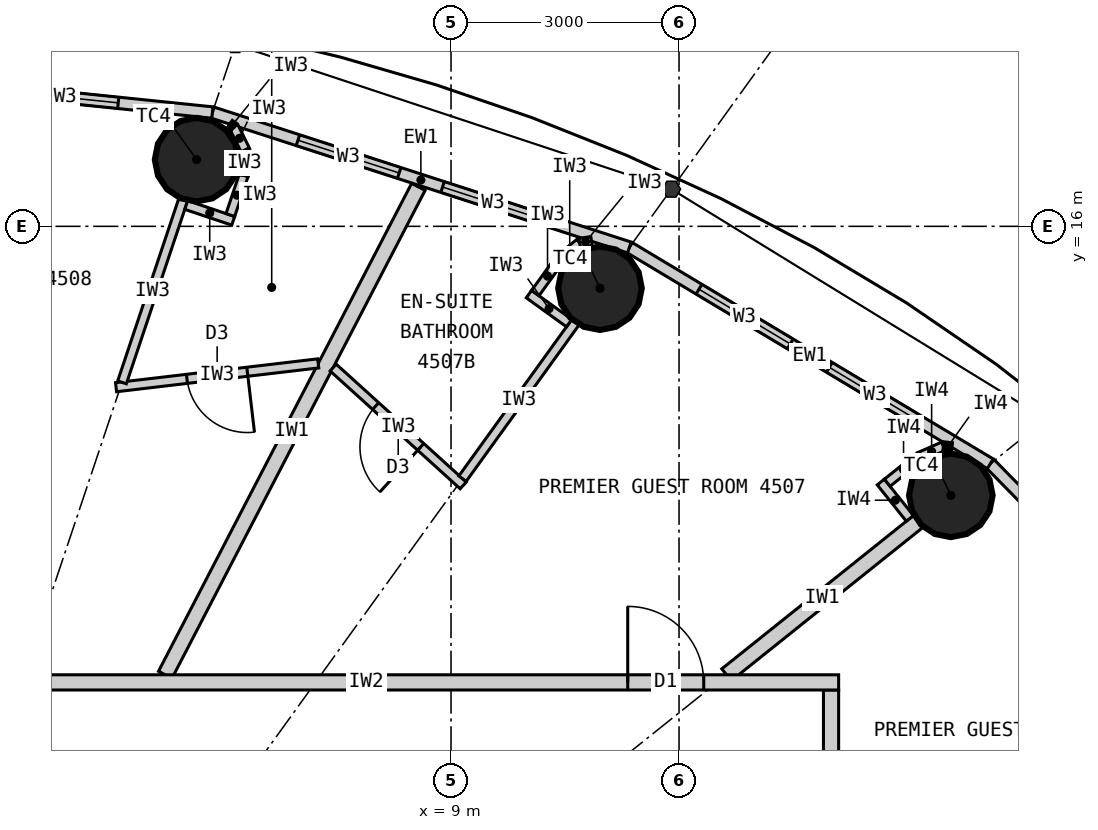
"""IFC4 building model, lengths in metres.
Left out: names, types, materials, properties, quantities, classifications, styles, units other than length and angle.
Written with IfcOpenShell. Run it as: python <this file> out.ifc"""

import sys

from ifc_helpers import new_model, si_unit, direction, frame, frame_2d, origin, origin_2d, place, context, subcontext, project, spatial, rectangle, circle, extrude, element, fill, save


model = new_model("IFC4")
c1 = context("Model", 3, precision=1e-05, world=origin(), true_north=direction((0.0, 1.0)))
c2 = subcontext(c1, "Body", "Model", "MODEL_VIEW")
j1 = project(units=[si_unit("LENGTHUNIT", "METRE"), si_unit("PLANEANGLEUNIT", "RADIAN")], contexts=[c1])
p1 = place(None, origin())
s1 = spatial("IfcSite", under=j1, at=p1, CompositionType="ELEMENT")
p2 = place(p1, origin())
s2 = spatial("IfcBuilding", under=s1, at=p2, CompositionType="ELEMENT")
p3 = place(p2, frame((0.0, 0.0, 169.8)))
s3 = spatial("IfcBuildingStorey", under=s2, at=p3, CompositionType="ELEMENT", Elevation=169.8)
for number, where, z_axis, x_axis in (
    (1, (15.576, 12.461, 0.0), (0.0, 0.0, 1.0), (1.0, 0.0, 0.0)),
    (2, (10.96, 15.186, 0.0), (0.0, 0.0, 1.0), (1.0, 0.0, 0.0)),
    (3, (5.653, 16.877, 0.0), (0.0, 0.0, 1.0), (1.0, 0.0, 0.0)),
):
    element("IfcColumn", number, at=place(p3, frame(where, z_axis=z_axis, x_axis=x_axis)), inside=s3, PredefinedType="COLUMN", context=c2, shape_type="SweptSolid", body=[
        extrude(circle(Radius=0.55, at=origin_2d()), origin(), (0.0, 0.0, 1.0), 3.3),
    ])
p4 = place(p3, frame((19.772, 9.132, 0.0), z_axis=(0.0, 0.0, 1.0), x_axis=(-0.700727467776, 0.71342905457, 0.0)))
e4 = element("IfcWall", 4, at=p4, inside=s3, PredefinedType="ELEMENTEDWALL", context=c2, shape_type="SweptSolid", body=[
    extrude(rectangle(XDim=5.247, YDim=0.15, at=frame_2d((2.624, 0.0))), origin(), (0.0, 0.0, 1.0), 3.12),
])
p5 = place(p4, frame((0.924, 0.0, 0.9)))
e5 = element("IfcOpeningElement", 5, at=p5, cuts=e4, PredefinedType="OPENING", context=c2, shape_type="SweptSolid", body=[
    extrude(rectangle(XDim=1.4, YDim=1.9, at=frame_2d((0.7, 0.95))), frame((0.0, 0.085, 0.0), z_axis=(0.0, -1.0, 0.0), x_axis=(1.0, 0.0, 0.0)), (0.0, 0.0, 1.0), 0.17),
])
p6 = place(p4, frame((2.924, 0.0, 0.9)))
e6 = element("IfcOpeningElement", 6, at=p6, cuts=e4, PredefinedType="OPENING", context=c2, shape_type="SweptSolid", body=[
    extrude(rectangle(XDim=1.4, YDim=1.9, at=frame_2d((0.7, 0.95))), frame((0.0, 0.085, 0.0), z_axis=(0.0, -1.0, 0.0), x_axis=(1.0, 0.0, 0.0)), (0.0, 0.0, 1.0), 0.17),
])
p7 = place(p3, frame((16.095, 12.876, 0.0), z_axis=(0.0, 0.0, 1.0), x_axis=(-0.857695199231, 0.514158482587, 0.0)))
e7 = element("IfcWall", 7, at=p7, inside=s3, PredefinedType="ELEMENTEDWALL", context=c2, shape_type="SweptSolid", body=[
    extrude(rectangle(XDim=5.536, YDim=0.15, at=frame_2d((2.768, 0.0))), origin(), (0.0, 0.0, 1.0), 3.12),
])
p8 = place(p7, frame((1.068, 0.0, 0.9)))
e8 = element("IfcOpeningElement", 8, at=p8, cuts=e7, PredefinedType="OPENING", context=c2, shape_type="SweptSolid", body=[
    extrude(rectangle(XDim=1.4, YDim=1.9, at=frame_2d((0.7, 0.95))), frame((0.0, 0.085, 0.0), z_axis=(0.0, -1.0, 0.0), x_axis=(1.0, 0.0, 0.0)), (0.0, 0.0, 1.0), 0.17),
])
p9 = place(p7, frame((3.068, 0.0, 0.9)))
e9 = element("IfcOpeningElement", 9, at=p9, cuts=e7, PredefinedType="OPENING", context=c2, shape_type="SweptSolid", body=[
    extrude(rectangle(XDim=1.4, YDim=1.9, at=frame_2d((0.7, 0.95))), frame((0.0, 0.085, 0.0), z_axis=(0.0, -1.0, 0.0), x_axis=(1.0, 0.0, 0.0)), (0.0, 0.0, 1.0), 0.17),
])
p10 = place(p3, frame((11.346, 15.722, 0.0), z_axis=(0.0, 0.0, 1.0), x_axis=(-0.951432482129, 0.307857486429, 0.0)))
e10 = element("IfcWall", 10, at=p10, inside=s3, PredefinedType="ELEMENTEDWALL", context=c2, shape_type="SweptSolid", body=[
    extrude(rectangle(XDim=5.766, YDim=0.15, at=frame_2d((2.883, 0.0))), origin(), (0.0, 0.0, 1.0), 3.12),
])
p11 = place(p10, frame((1.183, 0.0, 0.9)))
e11 = element("IfcOpeningElement", 11, at=p11, cuts=e10, PredefinedType="OPENING", context=c2, shape_type="SweptSolid", body=[
    extrude(rectangle(XDim=1.4, YDim=1.9, at=frame_2d((0.7, 0.95))), frame((0.0, 0.085, 0.0), z_axis=(0.0, -1.0, 0.0), x_axis=(1.0, 0.0, 0.0)), (0.0, 0.0, 1.0), 0.17),
])
p12 = place(p10, frame((3.183, 0.0, 0.9)))
e12 = element("IfcOpeningElement", 12, at=p12, cuts=e10, PredefinedType="OPENING", context=c2, shape_type="SweptSolid", body=[
    extrude(rectangle(XDim=1.4, YDim=1.9, at=frame_2d((0.7, 0.95))), frame((0.0, 0.085, 0.0), z_axis=(0.0, -1.0, 0.0), x_axis=(1.0, 0.0, 0.0)), (0.0, 0.0, 1.0), 0.17),
])
p13 = place(p3, frame((5.86, 17.497, 0.0), z_axis=(0.0, 0.0, 1.0), x_axis=(-0.994751738032, 0.102318032045, 0.0)))
e13 = element("IfcWall", 13, at=p13, inside=s3, PredefinedType="ELEMENTEDWALL", context=c2, shape_type="SweptSolid", body=[
    extrude(rectangle(XDim=5.891, YDim=0.15, at=frame_2d((2.946, 0.0))), origin(), (0.0, 0.0, 1.0), 3.12),
])
p14 = place(p13, frame((1.246, 0.0, 0.9)))
e14 = element("IfcOpeningElement", 14, at=p14, cuts=e13, PredefinedType="OPENING", context=c2, shape_type="SweptSolid", body=[
    extrude(rectangle(XDim=1.4, YDim=1.9, at=frame_2d((0.7, 0.95))), frame((0.0, 0.085, 0.0), z_axis=(0.0, -1.0, 0.0), x_axis=(1.0, 0.0, 0.0)), (0.0, 0.0, 1.0), 0.17),
])
p15 = place(p13, frame((3.246, 0.0, 0.9)))
e15 = element("IfcOpeningElement", 15, at=p15, cuts=e13, PredefinedType="OPENING", context=c2, shape_type="SweptSolid", body=[
    extrude(rectangle(XDim=1.4, YDim=1.9, at=frame_2d((0.7, 0.95))), frame((0.0, 0.085, 0.0), z_axis=(0.0, -1.0, 0.0), x_axis=(1.0, 0.0, 0.0)), (0.0, 0.0, 1.0), 0.17),
])
p16 = place(p3, frame((14.0, -9.9, 0.0), z_axis=(0.0, 0.0, 1.0), x_axis=(0.0, 1.0, 0.0)))
e16 = element("IfcWall", 16, at=p16, inside=s3, PredefinedType="PARTITIONING", context=c2, shape_type="SweptSolid", body=[
    extrude(rectangle(XDim=19.8, YDim=0.2, at=frame_2d((9.9, 0.0))), origin(), (0.0, 0.0, 1.0), 3.12),
])
p17 = place(p16, frame((3.688, 0.0, 0.0)))
e17 = element("IfcOpeningElement", 17, at=p17, cuts=e16, PredefinedType="OPENING", context=c2, shape_type="SweptSolid", body=[
    extrude(rectangle(XDim=1.0, YDim=2.2, at=frame_2d((0.5, 1.1))), frame((0.0, 0.11, 0.0), z_axis=(0.0, -1.0, 0.0), x_axis=(1.0, 0.0, 0.0)), (0.0, 0.0, 1.0), 0.22),
])
p18 = place(p16, frame((9.979, 0.0, 0.0)))
e18 = element("IfcOpeningElement", 18, at=p18, cuts=e16, PredefinedType="OPENING", context=c2, shape_type="SweptSolid", body=[
    extrude(rectangle(XDim=1.0, YDim=2.2, at=frame_2d((0.5, 1.1))), frame((0.0, 0.11, 0.0), z_axis=(0.0, -1.0, 0.0), x_axis=(1.0, 0.0, 0.0)), (0.0, 0.0, 1.0), 0.22),
])
p19 = place(p16, frame((17.122, 0.0, 0.0)))
e19 = element("IfcOpeningElement", 19, at=p19, cuts=e16, PredefinedType="OPENING", context=c2, shape_type="SweptSolid", body=[
    extrude(rectangle(XDim=1.0, YDim=2.2, at=frame_2d((0.5, 1.1))), frame((0.0, 0.11, 0.0), z_axis=(0.0, -1.0, 0.0), x_axis=(1.0, 0.0, 0.0)), (0.0, 0.0, 1.0), 0.22),
])
p20 = place(p3, frame((12.625, 10.1, 0.0), z_axis=(0.0, 0.0, 1.0), x_axis=(0.780876185034, 0.624685827954, 0.0)))
e20 = element("IfcWall", 20, at=p20, inside=s3, PredefinedType="PARTITIONING", context=c2, shape_type="SweptSolid", body=[
    extrude(rectangle(XDim=3.229, YDim=0.2, at=frame_2d((1.615, 0.0))), origin(), (0.0, 0.0, 1.0), 2.42),
])
p21 = place(p3, frame((5.24, 10.1, 0.0), z_axis=(0.0, 0.0, 1.0), x_axis=(0.460532965373, 0.887642601391, 0.0)))
e21 = element("IfcWall", 21, at=p21, inside=s3, PredefinedType="PARTITIONING", context=c2, shape_type="SweptSolid", body=[
    extrude(rectangle(XDim=7.231, YDim=0.2, at=frame_2d((3.616, 0.0))), origin(), (0.0, 0.0, 1.0), 3.12),
])
p22 = place(p3, frame((7.45, 14.142, 0.0), z_axis=(0.0, 0.0, 1.0), x_axis=(0.74113984586, -0.671350675041, 0.0)))
e22 = element("IfcWall", 22, at=p22, inside=s3, PredefinedType="PARTITIONING", context=c2, shape_type="SweptSolid", body=[
    extrude(rectangle(XDim=2.309, YDim=0.12, at=frame_2d((1.154, 0.0))), origin(), (0.0, 0.0, 1.0), 3.12),
])
p23 = place(p22, frame((0.754, 0.0, 0.0)))
e23 = element("IfcOpeningElement", 23, at=p23, cuts=e22, PredefinedType="OPENING", context=c2, shape_type="SweptSolid", body=[
    extrude(rectangle(XDim=0.8, YDim=2.1, at=frame_2d((0.4, 1.05))), frame((0.0, 0.07, 0.0), z_axis=(0.0, -1.0, 0.0), x_axis=(1.0, 0.0, 0.0)), (0.0, 0.0, 1.0), 0.14),
])
p24 = place(p3, frame((9.151, 12.681, 0.0), z_axis=(0.0, 0.0, 1.0), x_axis=(0.585258912334, 0.8108464747, 0.0)))
e24 = element("IfcWall", 24, at=p24, inside=s3, PredefinedType="PARTITIONING", context=c2, shape_type="SweptSolid", body=[
    extrude(rectangle(XDim=2.54, YDim=0.12, at=frame_2d((1.27, 0.0))), origin(), (0.0, 0.0, 1.0), 2.42),
])
p25 = place(p3, frame((10.554, 14.727, 0.0), z_axis=(0.0, 0.0, 1.0), x_axis=(-0.811044231224, 0.584984833135, 0.0)))
e25 = element("IfcWall", 25, at=p25, inside=s3, PredefinedType="PARTITIONING", context=c2, shape_type="SweptSolid", body=[
    extrude(rectangle(XDim=0.652, YDim=0.12, at=frame_2d((0.326, 0.0))), origin(), (0.0, 0.0, 1.0), 3.12),
])
p26 = place(p3, frame((10.109, 15.122, 0.0), z_axis=(0.0, 0.0, 1.0), x_axis=(0.585344718358, 0.810784534072, 0.0)))
e26 = element("IfcWall", 26, at=p26, inside=s3, PredefinedType="PARTITIONING", context=c2, shape_type="SweptSolid", body=[
    extrude(rectangle(XDim=0.55, YDim=0.12, at=frame_2d((0.275, 0.0))), origin(), (0.0, 0.0, 1.0), 3.12),
])
p27 = place(p3, frame((10.431, 15.568, 0.0), z_axis=(0.0, 0.0, 1.0), x_axis=(0.77505137267, 0.631898227345, 0.0)))
e27 = element("IfcWall", 27, at=p27, inside=s3, PredefinedType="PARTITIONING", context=c2, shape_type="SweptSolid", body=[
    extrude(rectangle(XDim=0.338, YDim=0.12, at=frame_2d((0.169, 0.0))), origin(), (0.0, 0.0, 1.0), 3.12),
])
p28 = place(p3, frame((10.693, 15.781, 0.0), z_axis=(0.0, 0.0, 1.0), x_axis=(0.987256785332, 0.159135287777, 0.0)))
e28 = element("IfcWall", 28, at=p28, inside=s3, PredefinedType="PARTITIONING", context=c2, shape_type="SweptSolid", body=[
    extrude(rectangle(XDim=0.158, YDim=0.12, at=frame_2d((0.079, 0.0))), origin(), (0.0, 0.0, 1.0), 3.12),
])
p29 = place(p3, frame((7.253, 14.197, 0.0), z_axis=(0.0, 0.0, 1.0), x_axis=(-0.993128188393, -0.117031625725, 0.0)))
e29 = element("IfcWall", 29, at=p29, inside=s3, PredefinedType="PARTITIONING", context=c2, shape_type="SweptSolid", body=[
    extrude(rectangle(XDim=2.678, YDim=0.12, at=frame_2d((1.339, 0.0))), origin(), (0.0, 0.0, 1.0), 3.12),
])
p30 = place(p29, frame((0.939, 0.0, 0.0)))
e30 = element("IfcOpeningElement", 30, at=p30, cuts=e29, PredefinedType="OPENING", context=c2, shape_type="SweptSolid", body=[
    extrude(rectangle(XDim=0.8, YDim=2.1, at=frame_2d((0.4, 1.05))), frame((0.0, 0.07, 0.0), z_axis=(0.0, -1.0, 0.0), x_axis=(1.0, 0.0, 0.0)), (0.0, 0.0, 1.0), 0.14),
])
p31 = place(p3, frame((4.671, 13.948, 0.0), z_axis=(0.0, 0.0, 1.0), x_axis=(0.317669167093, 0.948201613729, 0.0)))
e31 = element("IfcWall", 31, at=p31, inside=s3, PredefinedType="PARTITIONING", context=c2, shape_type="SweptSolid", body=[
    extrude(rectangle(XDim=2.54, YDim=0.12, at=frame_2d((1.27, 0.0))), origin(), (0.0, 0.0, 1.0), 2.42),
])
p32 = place(p3, frame((5.516, 16.28, 0.0), z_axis=(0.0, 0.0, 1.0), x_axis=(0.948157944392, -0.317799484717, 0.0)))
e32 = element("IfcWall", 32, at=p32, inside=s3, PredefinedType="PARTITIONING", context=c2, shape_type="SweptSolid", body=[
    extrude(rectangle(XDim=0.652, YDim=0.12, at=frame_2d((0.326, 0.0))), origin(), (0.0, 0.0, 1.0), 3.12),
])
p33 = place(p3, frame((6.097, 16.149, 0.0), z_axis=(0.0, 0.0, 1.0), x_axis=(0.317292604854, 0.948327687514, 0.0)))
e33 = element("IfcWall", 33, at=p33, inside=s3, PredefinedType="PARTITIONING", context=c2, shape_type="SweptSolid", body=[
    extrude(rectangle(XDim=0.55, YDim=0.12, at=frame_2d((0.275, 0.0))), origin(), (0.0, 0.0, 1.0), 3.12),
])
for number, where, z_axis, x_axis in (
    (34, (6.271, 16.67, 0.0), (0.0, 0.0, 1.0), (0.061, 0.998, 0.0)),
    (35, (6.292, 17.007, 0.0), (0.0, 0.0, 1.0), (-0.445, 0.895, 0.0)),
):
    element("IfcWall", number, at=place(p3, frame(where, z_axis=z_axis, x_axis=x_axis)), inside=s3, PredefinedType="PARTITIONING", context=c2, shape_type="SweptSolid", body=[
        extrude(rectangle(XDim=0.338, YDim=0.12, at=frame_2d((0.169, 0.0))), origin(), (0.0, 0.0, 1.0), 3.12),
    ])
p34 = place(p3, frame((6.142, 17.31, 0.0), z_axis=(0.0, 0.0, 1.0), x_axis=(-0.835039693181, 0.550189704386, 0.0)))
e36 = element("IfcWall", 36, at=p34, inside=s3, PredefinedType="PARTITIONING", context=c2, shape_type="SweptSolid", body=[
    extrude(rectangle(XDim=0.062, YDim=0.12, at=frame_2d((0.031, 0.0))), origin(), (0.0, 0.0, 1.0), 3.12),
])
p35 = place(p3, frame((1.67, 10.0, 0.0), z_axis=(0.0, 0.0, 1.0), x_axis=(1.0, 0.0, 0.0)))
e37 = element("IfcWall", 37, at=p35, inside=s3, PredefinedType="PARTITIONING", context=c2, shape_type="SweptSolid", body=[
    extrude(rectangle(XDim=12.43, YDim=0.2, at=frame_2d((6.215, 0.0))), origin(), (0.0, 0.0, 1.0), 3.12),
])
p36 = place(p35, frame((9.655, 0.0, 0.0)))
e38 = element("IfcOpeningElement", 38, at=p36, cuts=e37, PredefinedType="OPENING", context=c2, shape_type="SweptSolid", body=[
    extrude(rectangle(XDim=1.0, YDim=2.2, at=frame_2d((0.5, 1.1))), frame((0.0, 0.11, 0.0), z_axis=(0.0, -1.0, 0.0), x_axis=(1.0, 0.0, 0.0)), (0.0, 0.0, 1.0), 0.22),
])
p37 = place(p3, frame((15.037, 12.158, 0.0), z_axis=(0.0, 0.0, 1.0), x_axis=(-0.624840920722, 0.78075208856, 0.0)))
e39 = element("IfcWall", 39, at=p37, inside=s3, PredefinedType="PARTITIONING", context=c2, shape_type="SweptSolid", body=[
    extrude(rectangle(XDim=0.612, YDim=0.12, at=frame_2d((0.306, 0.0))), origin(), (0.0, 0.0, 1.0), 3.12),
])
p38 = place(p3, frame((14.739, 12.627, 0.0), z_axis=(0.0, 0.0, 1.0), x_axis=(0.780912119987, 0.624640905527, 0.0)))
e40 = element("IfcWall", 40, at=p38, inside=s3, PredefinedType="PARTITIONING", context=c2, shape_type="SweptSolid", body=[
    extrude(rectangle(XDim=0.55, YDim=0.12, at=frame_2d((0.275, 0.0))), origin(), (0.0, 0.0, 1.0), 3.12),
])
p39 = place(p3, frame((15.169, 12.97, 0.0), z_axis=(0.0, 0.0, 1.0), x_axis=(0.915974725257, 0.401235968838, 0.0)))
e41 = element("IfcWall", 41, at=p39, inside=s3, PredefinedType="PARTITIONING", context=c2, shape_type="SweptSolid", body=[
    extrude(rectangle(XDim=0.338, YDim=0.12, at=frame_2d((0.169, 0.0))), origin(), (0.0, 0.0, 1.0), 3.12),
])
p40 = place(p3, frame((15.478, 13.106, 0.0), z_axis=(0.0, 0.0, 1.0), x_axis=(0.993778813557, -0.111371763588, 0.0)))
e42 = element("IfcWall", 42, at=p40, inside=s3, PredefinedType="PARTITIONING", context=c2, shape_type="SweptSolid", body=[
    extrude(rectangle(XDim=0.114, YDim=0.12, at=frame_2d((0.057, 0.0))), origin(), (0.0, 0.0, 1.0), 3.12),
])
p41 = place(p8, origin())
e43 = element("IfcWindow", 43, at=p41, inside=s3, PartitioningType="SINGLE_PANEL", PredefinedType="WINDOW", context=c2, shape_type="SweptSolid", body=[
    extrude(rectangle(XDim=1.4, YDim=1.9, at=frame_2d((0.7, 0.95))), frame((0.0, 0.03, 0.0), z_axis=(0.0, -1.0, 0.0), x_axis=(1.0, 0.0, 0.0)), (0.0, 0.0, 1.0), 0.06),
])
fill(e8, e43)
p42 = place(p9, origin())
e44 = element("IfcWindow", 44, at=p42, inside=s3, PartitioningType="SINGLE_PANEL", PredefinedType="WINDOW", context=c2, shape_type="SweptSolid", body=[
    extrude(rectangle(XDim=1.4, YDim=1.9, at=frame_2d((0.7, 0.95))), frame((0.0, 0.03, 0.0), z_axis=(0.0, -1.0, 0.0), x_axis=(1.0, 0.0, 0.0)), (0.0, 0.0, 1.0), 0.06),
])
fill(e9, e44)
p43 = place(p11, origin())
e45 = element("IfcWindow", 45, at=p43, inside=s3, PartitioningType="SINGLE_PANEL", PredefinedType="WINDOW", context=c2, shape_type="SweptSolid", body=[
    extrude(rectangle(XDim=1.4, YDim=1.9, at=frame_2d((0.7, 0.95))), frame((0.0, 0.03, 0.0), z_axis=(0.0, -1.0, 0.0), x_axis=(1.0, 0.0, 0.0)), (0.0, 0.0, 1.0), 0.06),
])
fill(e11, e45)
p44 = place(p12, origin())
e46 = element("IfcWindow", 46, at=p44, inside=s3, PartitioningType="SINGLE_PANEL", PredefinedType="WINDOW", context=c2, shape_type="SweptSolid", body=[
    extrude(rectangle(XDim=1.4, YDim=1.9, at=frame_2d((0.7, 0.95))), frame((0.0, 0.03, 0.0), z_axis=(0.0, -1.0, 0.0), x_axis=(1.0, 0.0, 0.0)), (0.0, 0.0, 1.0), 0.06),
])
fill(e12, e46)
p45 = place(p14, origin())
e47 = element("IfcWindow", 47, at=p45, inside=s3, PartitioningType="SINGLE_PANEL", PredefinedType="WINDOW", context=c2, shape_type="SweptSolid", body=[
    extrude(rectangle(XDim=1.4, YDim=1.9, at=frame_2d((0.7, 0.95))), frame((0.0, 0.03, 0.0), z_axis=(0.0, -1.0, 0.0), x_axis=(1.0, 0.0, 0.0)), (0.0, 0.0, 1.0), 0.06),
])
fill(e14, e47)
p46 = place(p23, origin())
e48 = element("IfcDoor", 48, at=p46, inside=s3, OperationType="SINGLE_SWING_RIGHT", PredefinedType="DOOR", context=c2, shape_type="SweptSolid", body=[
    extrude(rectangle(XDim=0.8, YDim=2.1, at=frame_2d((0.4, 1.05))), frame((0.0, 0.025, 0.0), z_axis=(0.0, -1.0, 0.0), x_axis=(1.0, 0.0, 0.0)), (0.0, 0.0, 1.0), 0.05),
])
fill(e23, e48)
p47 = place(p36, origin())
e49 = element("IfcDoor", 49, at=p47, inside=s3, OperationType="SINGLE_SWING_LEFT", PredefinedType="DOOR", context=c2, shape_type="SweptSolid", body=[
    extrude(rectangle(XDim=1.0, YDim=2.2, at=frame_2d((0.5, 1.1))), frame((0.0, 0.025, 0.0), z_axis=(0.0, -1.0, 0.0), x_axis=(1.0, 0.0, 0.0)), (0.0, 0.0, 1.0), 0.05),
])
fill(e38, e49)
p48 = place(p30, origin())
e50 = element("IfcDoor", 50, at=p48, inside=s3, OperationType="SINGLE_SWING_LEFT", PredefinedType="DOOR", context=c2, shape_type="SweptSolid", body=[
    extrude(rectangle(XDim=0.8, YDim=2.1, at=frame_2d((0.4, 1.05))), frame((0.0, 0.025, 0.0), z_axis=(0.0, -1.0, 0.0), x_axis=(1.0, 0.0, 0.0)), (0.0, 0.0, 1.0), 0.05),
])
fill(e30, e50)
save(model, sys.argv[1])
